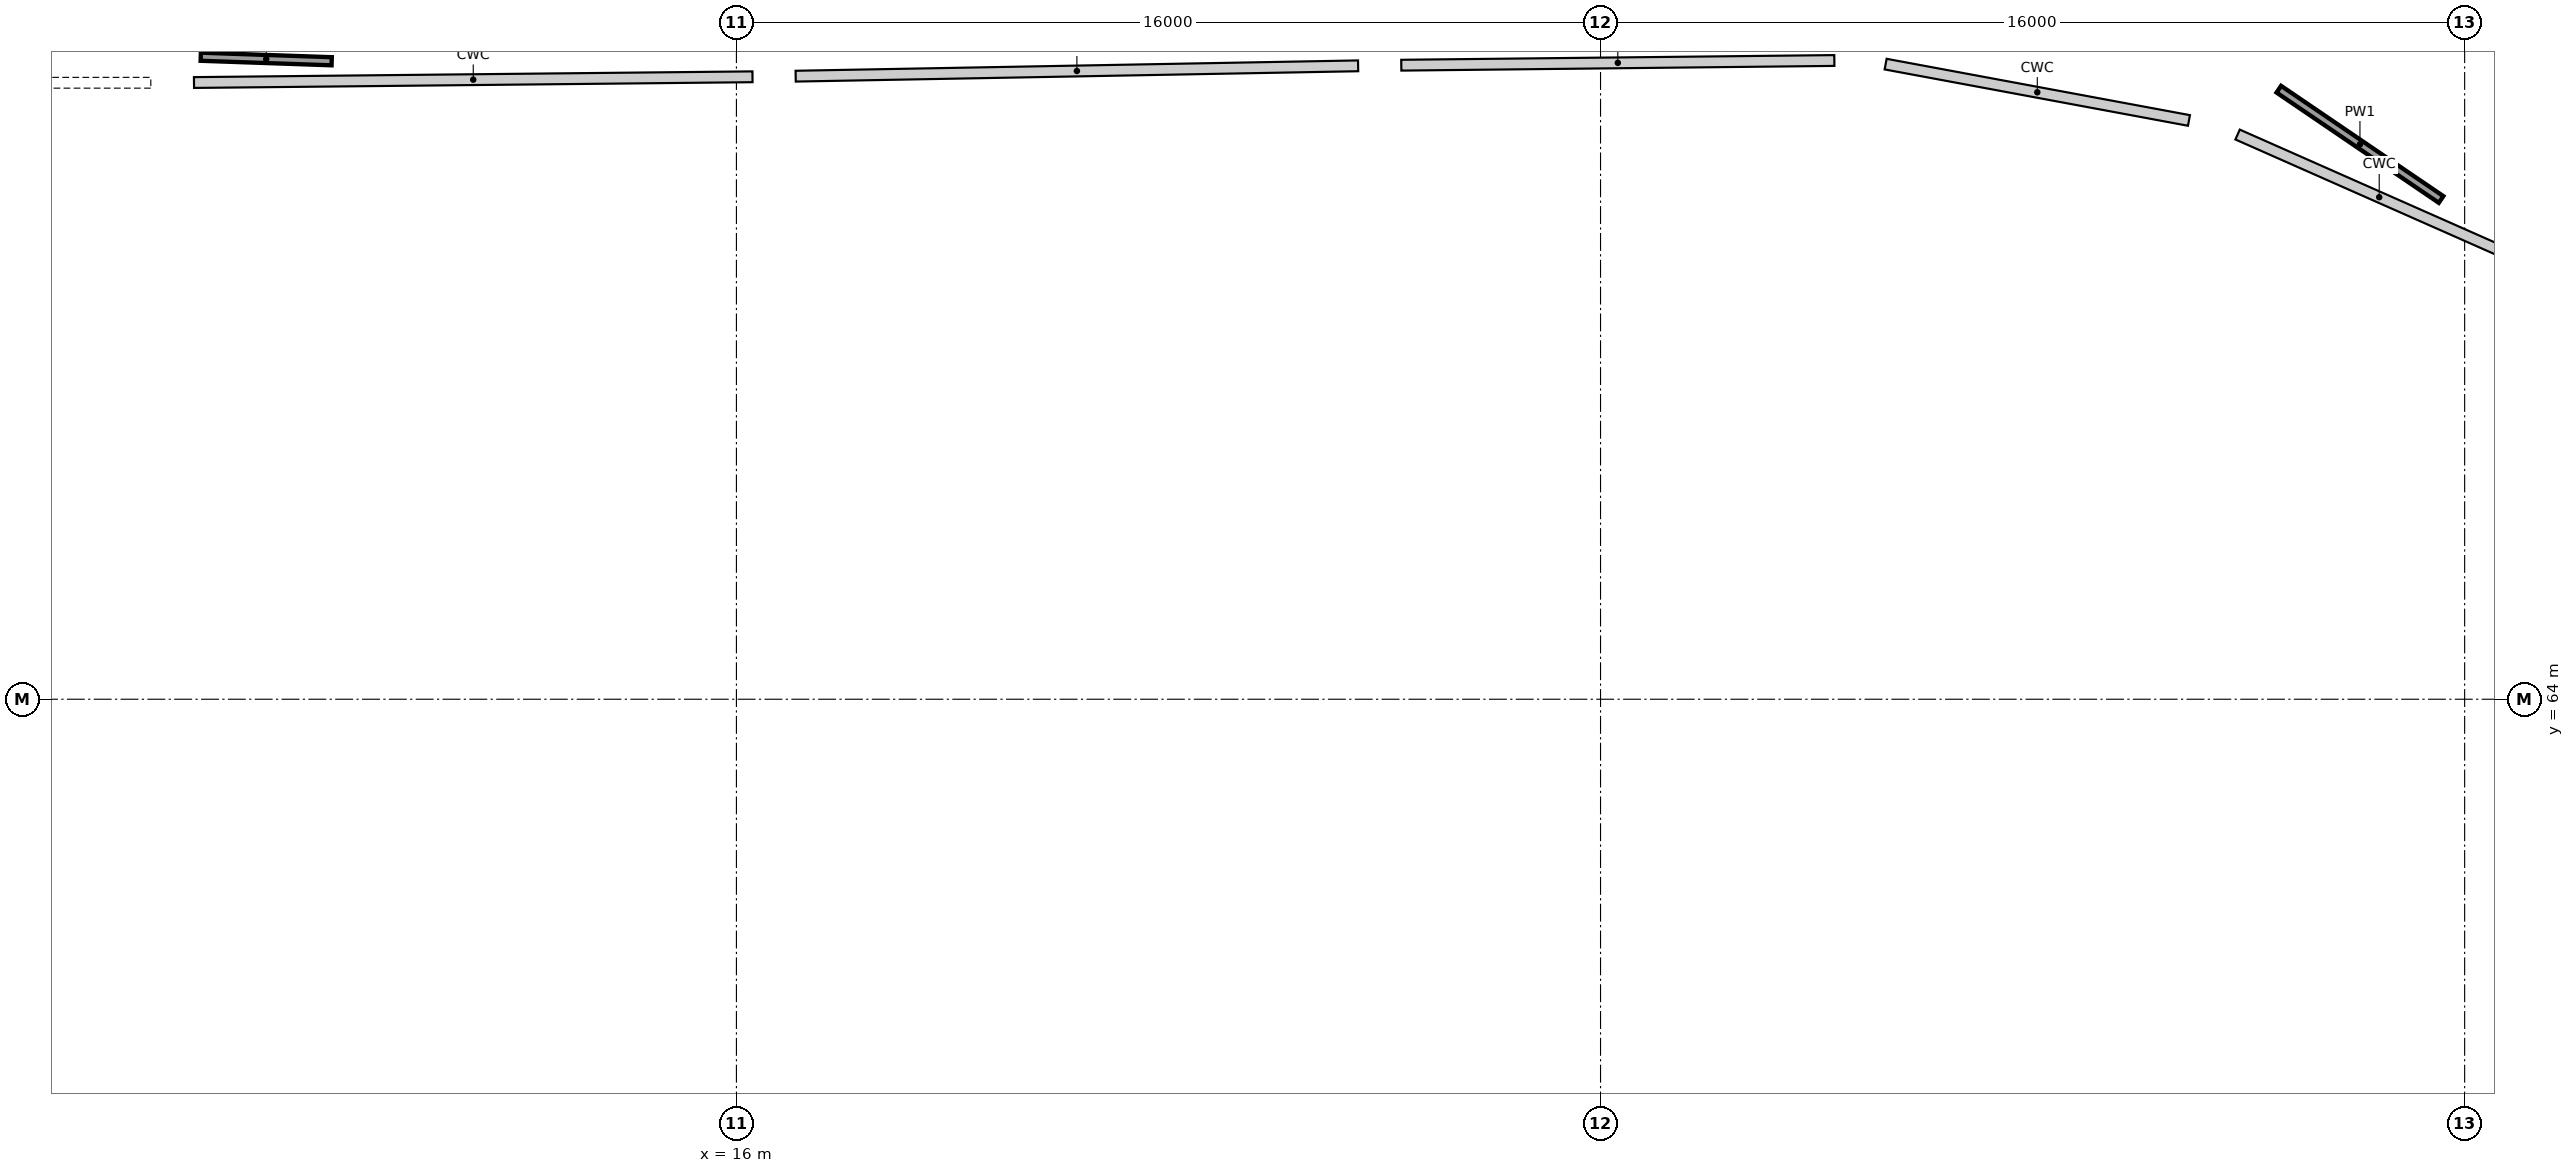
"""IFC4 building model, lengths in metres.
Left out: names, types, materials, properties, quantities, classifications, styles, units other than length and angle.
Written with IfcOpenShell. Run it as: python <this file> out.ifc"""

import sys

from ifc_helpers import new_model, si_unit, direction, frame, frame_2d, origin, origin_2d, place, context, subcontext, project, spatial, rectangle, circle, extrude, element, save


model = new_model("IFC4")
c1 = context("Model", 3, precision=1e-05, world=origin(), true_north=direction((0.0, 1.0)))
c2 = subcontext(c1, "Body", "Model", "MODEL_VIEW")
j1 = project(units=[si_unit("LENGTHUNIT", "METRE"), si_unit("PLANEANGLEUNIT", "RADIAN")], contexts=[c1])
p1 = place(None, origin())
s1 = spatial("IfcSite", under=j1, at=p1, CompositionType="ELEMENT")
p2 = place(p1, origin())
s2 = spatial("IfcBuilding", under=s1, at=p2, CompositionType="ELEMENT")
p3 = place(p2, frame((0.0, 0.0, 6.5)))
s3 = spatial("IfcBuildingStorey", under=s2, at=p3, CompositionType="ELEMENT", Elevation=6.5)
p4 = place(p3, frame((45.777, 68.5, 0.0), z_axis=(0.0, 0.0, 1.0), x_axis=(1.0, 0.0, 0.0)))
e1 = element("IfcColumn", 1, at=p4, inside=s3, PredefinedType="COLUMN", context=c2, shape_type="SweptSolid", body=[
    extrude(circle(Radius=0.45, at=origin_2d()), origin(), (0.0, 0.0, 1.0), 5.72),
])
p5 = place(p3, frame((40.308, 70.748, 0.0), z_axis=(0.0, 0.0, 1.0), x_axis=(1.0, 0.0, 0.0)))
e2 = element("IfcColumn", 2, at=p5, inside=s3, PredefinedType="COLUMN", context=c2, shape_type="SweptSolid", body=[
    extrude(circle(Radius=0.45, at=origin_2d()), origin(), (0.0, 0.0, 1.0), 5.868),
])
p6 = place(p3, frame((43.43, 74.617, 0.0), z_axis=(0.0, 0.0, 1.0), x_axis=(1.0, 0.0, 0.0)))
e3 = element("IfcColumn", 3, at=p6, inside=s3, PredefinedType="COLUMN", context=c2, shape_type="SweptSolid", body=[
    extrude(circle(Radius=0.4, at=origin_2d()), origin(), (0.0, 0.0, 1.0), 5.5),
])
p7 = place(p3, frame((44.39, 75.806, 0.0), z_axis=(0.0, 0.0, 1.0), x_axis=(1.0, 0.0, 0.0)))
e4 = element("IfcColumn", 4, at=p7, inside=s3, PredefinedType="COLUMN", context=c2, shape_type="SweptSolid", body=[
    extrude(circle(Radius=0.35, at=origin_2d()), origin(), (0.0, 0.0, 1.0), 5.5),
])
p8 = place(p3, frame((34.761, 72.156, 0.0), z_axis=(0.0, 0.0, 1.0), x_axis=(1.0, 0.0, 0.0)))
e5 = element("IfcColumn", 5, at=p8, inside=s3, PredefinedType="COLUMN", context=c2, shape_type="SweptSolid", body=[
    extrude(circle(Radius=0.45, at=origin_2d()), origin(), (0.0, 0.0, 1.0), 5.5),
])
p9 = place(p3, frame((36.886, 75.833, 0.0), z_axis=(0.0, 0.0, 1.0), x_axis=(1.0, 0.0, 0.0)))
e6 = element("IfcColumn", 6, at=p9, inside=s3, PredefinedType="COLUMN", context=c2, shape_type="SweptSolid", body=[
    extrude(circle(Radius=0.4, at=origin_2d()), origin(), (0.0, 0.0, 1.0), 5.5),
])
p10 = place(p3, frame((26.038, 71.014, 0.0), z_axis=(0.0, 0.0, 1.0), x_axis=(1.0, 0.0, 0.0)))
e7 = element("IfcColumn", 7, at=p10, inside=s3, PredefinedType="COLUMN", context=c2, shape_type="SweptSolid", body=[
    extrude(circle(Radius=0.45, at=origin_2d()), origin(), (0.0, 0.0, 1.0), 5.936),
])
p11 = place(p3, frame((27.911, 75.736, 0.0), z_axis=(0.0, 0.0, 1.0), x_axis=(1.0, 0.0, 0.0)))
e8 = element("IfcColumn", 8, at=p11, inside=s3, PredefinedType="COLUMN", context=c2, shape_type="SweptSolid", body=[
    extrude(circle(Radius=0.4, at=origin_2d()), origin(), (0.0, 0.0, 1.0), 5.5),
])
p12 = place(p3, frame((15.621, 71.009, 0.0), z_axis=(0.0, 0.0, 1.0), x_axis=(1.0, 0.0, 0.0)))
e9 = element("IfcColumn", 9, at=p12, inside=s3, PredefinedType="COLUMN", context=c2, shape_type="SweptSolid", body=[
    extrude(circle(Radius=0.45, at=origin_2d()), origin(), (0.0, 0.0, 1.0), 5.626),
])
p13 = place(p3, frame((16.698, 75.53, 0.0), z_axis=(0.0, 0.0, 1.0), x_axis=(1.0, 0.0, 0.0)))
e10 = element("IfcColumn", 10, at=p13, inside=s3, PredefinedType="COLUMN", context=c2, shape_type="SweptSolid", body=[
    extrude(circle(Radius=0.4, at=origin_2d()), origin(), (0.0, 0.0, 1.0), 5.5),
])
p14 = place(p3, frame((5.192, 70.824, 0.0), z_axis=(0.0, 0.0, 1.0), x_axis=(1.0, 0.0, 0.0)))
e11 = element("IfcColumn", 11, at=p14, inside=s3, PredefinedType="COLUMN", context=c2, shape_type="SweptSolid", body=[
    extrude(circle(Radius=0.45, at=origin_2d()), origin(), (0.0, 0.0, 1.0), 5.058),
])
p15 = place(p3, frame((5.557, 75.415, 0.0), z_axis=(0.0, 0.0, 1.0), x_axis=(1.0, 0.0, 0.0)))
e12 = element("IfcColumn", 12, at=p15, inside=s3, PredefinedType="COLUMN", context=c2, shape_type="SweptSolid", body=[
    extrude(circle(Radius=0.4, at=origin_2d()), origin(), (0.0, 0.0, 1.0), 5.5),
])
p16 = place(p3, frame((47.563, 73.253, 0.0), z_axis=(0.0, 0.0, 1.0), x_axis=(-0.827001497717, 0.562199717871, 0.0)))
e13 = element("IfcWall", 13, at=p16, inside=s3, PredefinedType="PARTITIONING", context=c2, shape_type="SweptSolid", body=[
    extrude(rectangle(XDim=3.633, YDim=0.15, at=frame_2d((1.816, 0.0))), origin(), (0.0, 0.0, 1.0), 5.15),
])
p17 = place(p3, frame((8.506, 75.813, 0.0), z_axis=(0.0, 0.0, 1.0), x_axis=(-0.999400729442, 0.034614765498, 0.0)))
e14 = element("IfcWall", 14, at=p17, inside=s3, PredefinedType="PARTITIONING", context=c2, shape_type="SweptSolid", body=[
    extrude(rectangle(XDim=2.426, YDim=0.15, at=frame_2d((1.213, 0.0))), origin(), (0.0, 0.0, 1.0), 5.15),
])
save(model, sys.argv[1])
